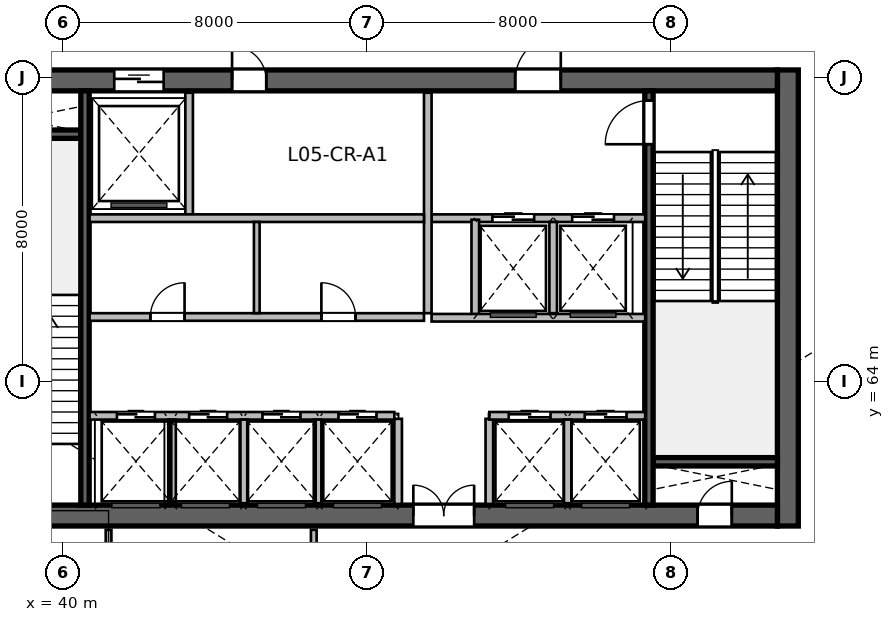
"""IFC4 building model, lengths in metres.
Left out: names, types, materials, properties, quantities, classifications, styles, units other than length and angle.
Written with IfcOpenShell. Run it as: python <this file> out.ifc"""

import sys

from ifc_helpers import new_model, si_unit, direction, frame, frame_2d, origin, place, context, subcontext, project, spatial, rectangle, extrude, source, transform, mapped, element, fill, save


model = new_model("IFC4")
c1 = context("Model", 3, precision=1e-05, world=origin(), true_north=direction((0.0, 1.0)))
c2 = subcontext(c1, "Body", "Model", "MODEL_VIEW")
j1 = project(units=[si_unit("LENGTHUNIT", "METRE"), si_unit("PLANEANGLEUNIT", "RADIAN")], contexts=[c1])
p1 = place(None, origin())
s1 = spatial("IfcSite", under=j1, at=p1, CompositionType="ELEMENT")
p2 = place(p1, origin())
s2 = spatial("IfcBuilding", under=s1, at=p2, CompositionType="ELEMENT")
p3 = place(p2, frame((0.0, 0.0, 30.0)))
s3 = spatial("IfcBuildingStorey", under=s2, at=p3, CompositionType="ELEMENT", Elevation=30.0)
m1 = source(origin(), c2, "Body", "SweptSolid", [
    extrude(rectangle(XDim=12.0, YDim=0.55, at=frame_2d((6.0, 0.0))), origin(), (0.0, 0.0, 1.0), 5.4),
])
p4 = place(p3, frame((59.075, 60.2, 0.0), z_axis=(0.0, 0.0, 1.0), x_axis=(0.0, 1.0, 0.0)))
e1 = element("IfcWall", 1, at=p4, inside=s3, PredefinedType="SHEAR", context=c2, shape_type="MappedRepresentation", body=[
    mapped(m1, transform((0.0, 0.0, 0.0), scale=1.0)),
])
m2 = source(origin(), c2, "Body", "SweptSolid", [
    extrude(rectangle(XDim=21.6, YDim=0.55, at=frame_2d((10.8, 0.0))), origin(), (0.0, 0.0, 1.0), 5.4),
])
p5 = place(p3, frame((37.2, 60.475, 0.0), z_axis=(0.0, 0.0, 1.0), x_axis=(1.0, 0.0, 0.0)))
e2 = element("IfcWall", 2, at=p5, inside=s3, PredefinedType="SHEAR", context=c2, shape_type="MappedRepresentation", body=[
    mapped(m2, transform((0.0, 0.0, 0.0), scale=1.0)),
])
p6 = place(p5, frame((1.1, 0.0, 0.0)))
e3 = element("IfcOpeningElement", 3, at=p6, cuts=e2, PredefinedType="OPENING", context=c2, shape_type="SweptSolid", body=[
    extrude(rectangle(XDim=1.15, YDim=2.15, at=frame_2d((0.575, 1.075))), frame((0.0, 0.285, 0.0), z_axis=(0.0, -1.0, 0.0), x_axis=(1.0, 0.0, 0.0)), (0.0, 0.0, 1.0), 0.57),
])
p7 = place(p5, frame((19.5, 0.0, 0.0)))
e4 = element("IfcOpeningElement", 4, at=p7, cuts=e2, PredefinedType="OPENING", context=c2, shape_type="SweptSolid", body=[
    extrude(rectangle(XDim=0.9, YDim=2.1, at=frame_2d((0.45, 1.05))), frame((0.0, 0.285, 0.0), z_axis=(0.0, -1.0, 0.0), x_axis=(1.0, 0.0, 0.0)), (0.0, 0.0, 1.0), 0.57),
])
p8 = place(p5, frame((12.02, 0.0, 0.0)))
e5 = element("IfcOpeningElement", 5, at=p8, cuts=e2, PredefinedType="OPENING", context=c2, shape_type="SweptSolid", body=[
    extrude(rectangle(XDim=1.6, YDim=2.15, at=frame_2d((0.8, 1.075))), frame((0.0, 0.285, 0.0), z_axis=(0.0, -1.0, 0.0), x_axis=(1.0, 0.0, 0.0)), (0.0, 0.0, 1.0), 0.57),
])
p9 = place(p3, frame((37.2, 71.925, 0.0), z_axis=(0.0, 0.0, 1.0), x_axis=(1.0, 0.0, 0.0)))
e6 = element("IfcWall", 6, at=p9, inside=s3, PredefinedType="SHEAR", context=c2, shape_type="MappedRepresentation", body=[
    mapped(m2, transform((0.0, 0.0, 0.0), scale=1.0)),
])
p10 = place(p9, frame((1.2, 0.0, 0.0)))
e7 = element("IfcOpeningElement", 7, at=p10, cuts=e6, PredefinedType="OPENING", context=c2, shape_type="SweptSolid", body=[
    extrude(rectangle(XDim=0.9, YDim=2.1, at=frame_2d((0.45, 1.05))), frame((0.0, 0.285, 0.0), z_axis=(0.0, -1.0, 0.0), x_axis=(1.0, 0.0, 0.0)), (0.0, 0.0, 1.0), 0.57),
])
p11 = place(p9, frame((14.7, 0.0, 0.0)))
e8 = element("IfcOpeningElement", 8, at=p11, cuts=e6, PredefinedType="OPENING", context=c2, shape_type="SweptSolid", body=[
    extrude(rectangle(XDim=1.2, YDim=2.15, at=frame_2d((0.6, 1.075))), frame((0.0, 0.285, 0.0), z_axis=(0.0, -1.0, 0.0), x_axis=(1.0, 0.0, 0.0)), (0.0, 0.0, 1.0), 0.57),
])
p12 = place(p9, frame((4.15, 0.0, 0.0)))
e9 = element("IfcOpeningElement", 9, at=p12, cuts=e6, PredefinedType="OPENING", context=c2, shape_type="SweptSolid", body=[
    extrude(rectangle(XDim=1.3, YDim=2.15, at=frame_2d((0.65, 1.075))), frame((0.0, 0.285, 0.0), z_axis=(0.0, -1.0, 0.0), x_axis=(1.0, 0.0, 0.0)), (0.0, 0.0, 1.0), 0.57),
])
p13 = place(p9, frame((7.25, 0.0, 0.0)))
e10 = element("IfcOpeningElement", 10, at=p13, cuts=e6, PredefinedType="OPENING", context=c2, shape_type="SweptSolid", body=[
    extrude(rectangle(XDim=0.9, YDim=2.1, at=frame_2d((0.45, 1.05))), frame((0.0, 0.285, 0.0), z_axis=(0.0, -1.0, 0.0), x_axis=(1.0, 0.0, 0.0)), (0.0, 0.0, 1.0), 0.57),
])
m3 = source(origin(), c2, "Body", "SweptSolid", [
    extrude(rectangle(XDim=3.27, YDim=0.22, at=frame_2d((1.635, 0.0))), origin(), (0.0, 0.0, 1.0), 5.4),
])
for number, where, z_axis, x_axis in (
    (11, (37.2, 70.51, 0.0), (0.0, 0.0, 1.0), (1.0, 0.0, 0.0)),
    (12, (55.53, 61.89, 0.0), (0.0, 0.0, 1.0), (1.0, 0.0, 0.0)),
):
    element("IfcWall", number, at=place(p3, frame(where, z_axis=z_axis, x_axis=x_axis)), inside=s3, PredefinedType="SHEAR", context=c2, shape_type="MappedRepresentation", body=[
        mapped(m3, transform((0.0, 0.0, 0.0), scale=1.0)),
    ])
m4 = source(origin(), c2, "Body", "SweptSolid", [
    extrude(rectangle(XDim=10.9, YDim=0.22, at=frame_2d((5.45, 0.0))), origin(), (0.0, 0.0, 1.0), 5.4),
])
p14 = place(p3, frame((40.58, 60.75, 0.0), z_axis=(0.0, 0.0, 1.0), x_axis=(0.0, 1.0, 0.0)))
e13 = element("IfcWall", 13, at=p14, inside=s3, PredefinedType="SHEAR", context=c2, shape_type="MappedRepresentation", body=[
    mapped(m4, transform((0.0, 0.0, 0.0), scale=1.0)),
])
p15 = place(p3, frame((55.42, 60.75, 0.0), z_axis=(0.0, 0.0, 1.0), x_axis=(0.0, 1.0, 0.0)))
e14 = element("IfcWall", 14, at=p15, inside=s3, PredefinedType="SHEAR", context=c2, shape_type="MappedRepresentation", body=[
    mapped(m4, transform((0.0, 0.0, 0.0), scale=1.0)),
])
p16 = place(p15, frame((9.495, 0.0, 0.0)))
e15 = element("IfcOpeningElement", 15, at=p16, cuts=e14, PredefinedType="OPENING", context=c2, shape_type="SweptSolid", body=[
    extrude(rectangle(XDim=1.15, YDim=2.15, at=frame_2d((0.575, 1.075))), frame((0.0, 0.12, 0.0), z_axis=(0.0, -1.0, 0.0), x_axis=(1.0, 0.0, 0.0)), (0.0, 0.0, 1.0), 0.24),
])
m5 = source(origin(), c2, "Body", "SweptSolid", [
    extrude(rectangle(XDim=2.24, YDim=0.2, at=frame_2d((1.12, 0.0))), origin(), (0.0, 0.0, 1.0), 5.16),
])
for number, where, z_axis, x_axis in (
    (16, (48.82, 60.78, 0.0), (0.0, 0.0, 1.0), (0.0, 1.0, 0.0)),
    (17, (51.22, 60.78, 0.0), (0.0, 0.0, 1.0), (0.0, 1.0, 0.0)),
):
    element("IfcWall", number, at=place(p3, frame(where, z_axis=z_axis, x_axis=x_axis)), inside=s3, PredefinedType="SOLIDWALL", context=c2, shape_type="MappedRepresentation", body=[
        mapped(m5, transform((0.0, 0.0, 0.0), scale=1.0)),
    ])
m6 = source(origin(), c2, "Body", "SweptSolid", [
    extrude(rectangle(XDim=5.62, YDim=0.2, at=frame_2d((2.81, 0.0))), origin(), (0.0, 0.0, 1.0), 5.16),
])
p17 = place(p3, frame((49.7, 68.3, 0.0), z_axis=(0.0, 0.0, 1.0), x_axis=(1.0, 0.0, 0.0)))
e18 = element("IfcWall", 18, at=p17, inside=s3, PredefinedType="SOLIDWALL", context=c2, shape_type="MappedRepresentation", body=[
    mapped(m6, transform((0.0, 0.0, 0.0), scale=1.0)),
])
p18 = place(p17, frame((1.6, 0.0, 0.0)))
e19 = element("IfcOpeningElement", 19, at=p18, cuts=e18, PredefinedType="OPENING", context=c2, shape_type="SweptSolid", body=[
    extrude(rectangle(XDim=1.1, YDim=2.15, at=frame_2d((0.55, 1.075))), frame((0.0, 0.11, 0.0), z_axis=(0.0, -1.0, 0.0), x_axis=(1.0, 0.0, 0.0)), (0.0, 0.0, 1.0), 0.22),
])
p19 = place(p17, frame((3.7, 0.0, 0.0)))
e20 = element("IfcOpeningElement", 20, at=p19, cuts=e18, PredefinedType="OPENING", context=c2, shape_type="SweptSolid", body=[
    extrude(rectangle(XDim=1.1, YDim=2.15, at=frame_2d((0.55, 1.075))), frame((0.0, 0.11, 0.0), z_axis=(0.0, -1.0, 0.0), x_axis=(1.0, 0.0, 0.0)), (0.0, 0.0, 1.0), 0.22),
])
m7 = source(origin(), c2, "Body", "SweptSolid", [
    extrude(rectangle(XDim=5.8, YDim=0.2, at=frame_2d((2.9, 0.0))), origin(), (0.0, 0.0, 1.0), 5.16),
])
p20 = place(p3, frame((49.6, 65.8, 0.0), z_axis=(0.0, 0.0, 1.0), x_axis=(0.0, 1.0, 0.0)))
e21 = element("IfcWall", 21, at=p20, inside=s3, PredefinedType="SOLIDWALL", context=c2, shape_type="MappedRepresentation", body=[
    mapped(m7, transform((0.0, 0.0, 0.0), scale=1.0)),
])
m8 = source(origin(), c2, "Body", "SweptSolid", [
    extrude(rectangle(XDim=2.58, YDim=0.2, at=frame_2d((1.29, 0.0))), origin(), (0.0, 0.0, 1.0), 5.16),
])
p21 = place(p3, frame((50.85, 65.68, 0.0), z_axis=(0.0, 0.0, 1.0), x_axis=(0.0, 1.0, 0.0)))
e22 = element("IfcWall", 22, at=p21, inside=s3, PredefinedType="SOLIDWALL", context=c2, shape_type="MappedRepresentation", body=[
    mapped(m8, transform((0.0, 0.0, 0.0), scale=1.0)),
])
m9 = source(origin(), c2, "Body", "SweptSolid", [
    extrude(rectangle(XDim=2.4, YDim=0.2, at=frame_2d((1.2, 0.0))), origin(), (0.0, 0.0, 1.0), 5.16),
])
p22 = place(p3, frame((52.9, 65.8, 0.0), z_axis=(0.0, 0.0, 1.0), x_axis=(0.0, 1.0, 0.0)))
e23 = element("IfcWall", 23, at=p22, inside=s3, PredefinedType="SOLIDWALL", context=c2, shape_type="MappedRepresentation", body=[
    mapped(m9, transform((0.0, 0.0, 0.0), scale=1.0)),
])
p23 = place(p3, frame((49.7, 65.68, 0.0), z_axis=(0.0, 0.0, 1.0), x_axis=(1.0, 0.0, 0.0)))
e24 = element("IfcWall", 24, at=p23, inside=s3, PredefinedType="SOLIDWALL", context=c2, shape_type="MappedRepresentation", body=[
    mapped(m6, transform((0.0, 0.0, 0.0), scale=1.0)),
])
m10 = source(origin(), c2, "Body", "SweptSolid", [
    extrude(rectangle(XDim=3.2, YDim=0.2, at=frame_2d((1.6, 0.0))), origin(), (0.0, 0.0, 1.0), 5.16),
])
p24 = place(p3, frame((43.32, 68.4, 0.0), z_axis=(0.0, 0.0, 1.0), x_axis=(0.0, 1.0, 0.0)))
e25 = element("IfcWall", 25, at=p24, inside=s3, PredefinedType="SOLIDWALL", context=c2, shape_type="MappedRepresentation", body=[
    mapped(m10, transform((0.0, 0.0, 0.0), scale=1.0)),
])
m11 = source(origin(), c2, "Body", "SweptSolid", [
    extrude(rectangle(XDim=8.8, YDim=0.2, at=frame_2d((4.4, 0.0))), origin(), (0.0, 0.0, 1.0), 5.16),
])
p25 = place(p3, frame((40.7, 68.3, 0.0), z_axis=(0.0, 0.0, 1.0), x_axis=(1.0, 0.0, 0.0)))
e26 = element("IfcWall", 26, at=p25, inside=s3, PredefinedType="SOLIDWALL", context=c2, shape_type="MappedRepresentation", body=[
    mapped(m11, transform((0.0, 0.0, 0.0), scale=1.0)),
])
m12 = source(origin(), c2, "Body", "SweptSolid", [
    extrude(rectangle(XDim=8.02, YDim=0.2, at=frame_2d((4.01, 0.0))), origin(), (0.0, 0.0, 1.0), 5.16),
])
p26 = place(p3, frame((40.7, 63.1, 0.0), z_axis=(0.0, 0.0, 1.0), x_axis=(1.0, 0.0, 0.0)))
e27 = element("IfcWall", 27, at=p26, inside=s3, PredefinedType="SOLIDWALL", context=c2, shape_type="MappedRepresentation", body=[
    mapped(m12, transform((0.0, 0.0, 0.0), scale=1.0)),
])
p27 = place(p26, frame((0.72, 0.0, 0.0)))
e28 = element("IfcOpeningElement", 28, at=p27, cuts=e27, PredefinedType="OPENING", context=c2, shape_type="SweptSolid", body=[
    extrude(rectangle(XDim=1.0, YDim=2.15, at=frame_2d((0.5, 1.075))), frame((0.0, 0.11, 0.0), z_axis=(0.0, -1.0, 0.0), x_axis=(1.0, 0.0, 0.0)), (0.0, 0.0, 1.0), 0.22),
])
p28 = place(p26, frame((2.62, 0.0, 0.0)))
e29 = element("IfcOpeningElement", 29, at=p28, cuts=e27, PredefinedType="OPENING", context=c2, shape_type="SweptSolid", body=[
    extrude(rectangle(XDim=1.0, YDim=2.15, at=frame_2d((0.5, 1.075))), frame((0.0, 0.11, 0.0), z_axis=(0.0, -1.0, 0.0), x_axis=(1.0, 0.0, 0.0)), (0.0, 0.0, 1.0), 0.22),
])
p29 = place(p26, frame((4.55, 0.0, 0.0)))
e30 = element("IfcOpeningElement", 30, at=p29, cuts=e27, PredefinedType="OPENING", context=c2, shape_type="SweptSolid", body=[
    extrude(rectangle(XDim=1.0, YDim=2.15, at=frame_2d((0.5, 1.075))), frame((0.0, 0.11, 0.0), z_axis=(0.0, -1.0, 0.0), x_axis=(1.0, 0.0, 0.0)), (0.0, 0.0, 1.0), 0.22),
])
p30 = place(p26, frame((6.55, 0.0, 0.0)))
e31 = element("IfcOpeningElement", 31, at=p30, cuts=e27, PredefinedType="OPENING", context=c2, shape_type="SweptSolid", body=[
    extrude(rectangle(XDim=1.0, YDim=2.15, at=frame_2d((0.5, 1.075))), frame((0.0, 0.11, 0.0), z_axis=(0.0, -1.0, 0.0), x_axis=(1.0, 0.0, 0.0)), (0.0, 0.0, 1.0), 0.22),
])
m13 = source(origin(), c2, "Body", "SweptSolid", [
    extrude(rectangle(XDim=4.1, YDim=0.2, at=frame_2d((2.05, 0.0))), origin(), (0.0, 0.0, 1.0), 5.16),
])
p31 = place(p3, frame((51.22, 63.1, 0.0), z_axis=(0.0, 0.0, 1.0), x_axis=(1.0, 0.0, 0.0)))
e32 = element("IfcWall", 32, at=p31, inside=s3, PredefinedType="SOLIDWALL", context=c2, shape_type="MappedRepresentation", body=[
    mapped(m13, transform((0.0, 0.0, 0.0), scale=1.0)),
])
p32 = place(p31, frame((0.51, 0.0, 0.0)))
e33 = element("IfcOpeningElement", 33, at=p32, cuts=e32, PredefinedType="OPENING", context=c2, shape_type="SweptSolid", body=[
    extrude(rectangle(XDim=1.1, YDim=2.15, at=frame_2d((0.55, 1.075))), frame((0.0, 0.11, 0.0), z_axis=(0.0, -1.0, 0.0), x_axis=(1.0, 0.0, 0.0)), (0.0, 0.0, 1.0), 0.22),
])
p33 = place(p31, frame((2.51, 0.0, 0.0)))
e34 = element("IfcOpeningElement", 34, at=p33, cuts=e32, PredefinedType="OPENING", context=c2, shape_type="SweptSolid", body=[
    extrude(rectangle(XDim=1.1, YDim=2.15, at=frame_2d((0.55, 1.075))), frame((0.0, 0.11, 0.0), z_axis=(0.0, -1.0, 0.0), x_axis=(1.0, 0.0, 0.0)), (0.0, 0.0, 1.0), 0.22),
])
m14 = source(origin(), c2, "Body", "SweptSolid", [
    extrude(rectangle(XDim=2.2, YDim=0.2, at=frame_2d((1.1, 0.0))), origin(), (0.0, 0.0, 1.0), 5.16),
])
for number, where, z_axis, x_axis in (
    (35, (42.87, 60.8, 0.0), (0.0, 0.0, 1.0), (0.0, 1.0, 0.0)),
    (36, (44.77, 60.8, 0.0), (0.0, 0.0, 1.0), (0.0, 1.0, 0.0)),
    (37, (46.7, 60.8, 0.0), (0.0, 0.0, 1.0), (0.0, 1.0, 0.0)),
    (38, (53.28, 60.8, 0.0), (0.0, 0.0, 1.0), (0.0, 1.0, 0.0)),
):
    element("IfcWall", number, at=place(p3, frame(where, z_axis=z_axis, x_axis=x_axis)), inside=s3, PredefinedType="SOLIDWALL", context=c2, shape_type="MappedRepresentation", body=[
        mapped(m14, transform((0.0, 0.0, 0.0), scale=1.0)),
    ])
p34 = place(p3, frame((40.7, 65.7, 0.0), z_axis=(0.0, 0.0, 1.0), x_axis=(1.0, 0.0, 0.0)))
e39 = element("IfcWall", 39, at=p34, inside=s3, PredefinedType="SOLIDWALL", context=c2, shape_type="MappedRepresentation", body=[
    mapped(m11, transform((0.0, 0.0, 0.0), scale=1.0)),
])
p35 = place(p34, frame((1.6, 0.0, 0.0)))
e40 = element("IfcOpeningElement", 40, at=p35, cuts=e39, PredefinedType="OPENING", context=c2, shape_type="SweptSolid", body=[
    extrude(rectangle(XDim=0.9, YDim=2.1, at=frame_2d((0.45, 1.05))), frame((0.0, 0.11, 0.0), z_axis=(0.0, -1.0, 0.0), x_axis=(1.0, 0.0, 0.0)), (0.0, 0.0, 1.0), 0.22),
])
p36 = place(p34, frame((6.1, 0.0, 0.0)))
e41 = element("IfcOpeningElement", 41, at=p36, cuts=e39, PredefinedType="OPENING", context=c2, shape_type="SweptSolid", body=[
    extrude(rectangle(XDim=0.9, YDim=2.1, at=frame_2d((0.45, 1.05))), frame((0.0, 0.11, 0.0), z_axis=(0.0, -1.0, 0.0), x_axis=(1.0, 0.0, 0.0)), (0.0, 0.0, 1.0), 0.22),
])
m15 = source(origin(), c2, "Body", "SweptSolid", [
    extrude(rectangle(XDim=2.4, YDim=0.15, at=frame_2d((1.2, 0.0))), origin(), (0.0, 0.0, 1.0), 5.16),
])
p37 = place(p3, frame((45.1, 65.8, 0.0), z_axis=(0.0, 0.0, 1.0), x_axis=(0.0, 1.0, 0.0)))
e42 = element("IfcWall", 42, at=p37, inside=s3, PredefinedType="PARTITIONING", context=c2, shape_type="MappedRepresentation", body=[
    mapped(m15, transform((0.0, 0.0, 0.0), scale=1.0)),
])
m16 = source(origin(), c2, "Body", "SweptSolid", [
    extrude(rectangle(XDim=2.033, YDim=0.15, at=frame_2d((1.016, 0.0))), origin(), (0.0, 0.0, 1.0), 5.16),
])
p38 = place(p3, frame((41.2, 58.067, 0.0), z_axis=(0.0, 0.0, 1.0), x_axis=(0.0, 1.0, 0.0)))
e43 = element("IfcWall", 43, at=p38, inside=s3, PredefinedType="PARTITIONING", context=c2, shape_type="MappedRepresentation", body=[
    mapped(m16, transform((0.0, 0.0, 0.0), scale=1.0)),
])
p39 = place(p38, frame((0.591, 0.0, 0.0)))
e44 = element("IfcOpeningElement", 44, at=p39, cuts=e43, PredefinedType="OPENING", context=c2, shape_type="SweptSolid", body=[
    extrude(rectangle(XDim=0.85, YDim=2.1, at=frame_2d((0.425, 1.05))), frame((0.0, 0.085, 0.0), z_axis=(0.0, -1.0, 0.0), x_axis=(1.0, 0.0, 0.0)), (0.0, 0.0, 1.0), 0.17),
])
p40 = place(p3, frame((46.6, 58.067, 0.0), z_axis=(0.0, 0.0, 1.0), x_axis=(0.0, 1.0, 0.0)))
e45 = element("IfcWall", 45, at=p40, inside=s3, PredefinedType="PARTITIONING", context=c2, shape_type="MappedRepresentation", body=[
    mapped(m16, transform((0.0, 0.0, 0.0), scale=1.0)),
])
m17 = source(origin(), c2, "Body", "SweptSolid", [
    extrude(rectangle(XDim=0.9, YDim=2.1, at=frame_2d((0.45, 1.05))), frame((0.0, 0.025, 0.0), z_axis=(0.0, -1.0, 0.0), x_axis=(1.0, 0.0, 0.0)), (0.0, 0.0, 1.0), 0.05),
])
p41 = place(p7, origin())
e46 = element("IfcDoor", 46, at=p41, inside=s3, OperationType="SINGLE_SWING_RIGHT", PredefinedType="DOOR", context=c2, shape_type="MappedRepresentation", body=[
    mapped(m17, transform((0.0, 0.0, 0.0), scale=1.0)),
])
fill(e4, e46)
m18 = source(origin(), c2, "Body", "SweptSolid", [
    extrude(rectangle(XDim=1.15, YDim=2.15, at=frame_2d((0.575, 1.075))), frame((0.0, 0.025, 0.0), z_axis=(0.0, -1.0, 0.0), x_axis=(1.0, 0.0, 0.0)), (0.0, 0.0, 1.0), 0.05),
])
p42 = place(p16, origin())
e47 = element("IfcDoor", 47, at=p42, inside=s3, OperationType="SINGLE_SWING_LEFT", PredefinedType="DOOR", context=c2, shape_type="MappedRepresentation", body=[
    mapped(m18, transform((0.0, 0.0, 0.0), scale=1.0)),
])
fill(e15, e47)
m19 = source(origin(), c2, "Body", "SweptSolid", [
    extrude(rectangle(XDim=1.6, YDim=2.15, at=frame_2d((0.8, 1.075))), frame((0.0, 0.025, 0.0), z_axis=(0.0, -1.0, 0.0), x_axis=(1.0, 0.0, 0.0)), (0.0, 0.0, 1.0), 0.05),
])
p43 = place(p8, origin())
e48 = element("IfcDoor", 48, at=p43, inside=s3, OperationType="DOUBLE_DOOR_SINGLE_SWING", PredefinedType="DOOR", context=c2, shape_type="MappedRepresentation", body=[
    mapped(m19, transform((0.0, 0.0, 0.0), scale=1.0)),
])
fill(e5, e48)
m20 = source(origin(), c2, "Body", "SweptSolid", [
    extrude(rectangle(XDim=1.2, YDim=2.15, at=frame_2d((0.6, 1.075))), frame((0.0, 0.025, 0.0), z_axis=(0.0, -1.0, 0.0), x_axis=(1.0, 0.0, 0.0)), (0.0, 0.0, 1.0), 0.05),
])
p44 = place(p11, origin())
e49 = element("IfcDoor", 49, at=p44, inside=s3, OperationType="SINGLE_SWING_RIGHT", PredefinedType="DOOR", context=c2, shape_type="MappedRepresentation", body=[
    mapped(m20, transform((0.0, 0.0, 0.0), scale=1.0)),
])
fill(e8, e49)
m21 = source(origin(), c2, "Body", "SweptSolid", [
    extrude(rectangle(XDim=1.1, YDim=2.15, at=frame_2d((0.55, 1.075))), frame((0.0, 0.025, 0.0), z_axis=(0.0, -1.0, 0.0), x_axis=(1.0, 0.0, 0.0)), (0.0, 0.0, 1.0), 0.05),
])
p45 = place(p18, origin())
e50 = element("IfcDoor", 50, at=p45, inside=s3, OperationType="DOUBLE_DOOR_SLIDING", PredefinedType="DOOR", context=c2, shape_type="MappedRepresentation", body=[
    mapped(m21, transform((0.0, 0.0, 0.0), scale=1.0)),
])
fill(e19, e50)
p46 = place(p19, origin())
e51 = element("IfcDoor", 51, at=p46, inside=s3, OperationType="DOUBLE_DOOR_SLIDING", PredefinedType="DOOR", context=c2, shape_type="MappedRepresentation", body=[
    mapped(m21, transform((0.0, 0.0, 0.0), scale=1.0)),
])
fill(e20, e51)
m22 = source(origin(), c2, "Body", "SweptSolid", [
    extrude(rectangle(XDim=1.3, YDim=2.15, at=frame_2d((0.65, 1.075))), frame((0.0, 0.025, 0.0), z_axis=(0.0, -1.0, 0.0), x_axis=(1.0, 0.0, 0.0)), (0.0, 0.0, 1.0), 0.05),
])
p47 = place(p12, origin())
e52 = element("IfcDoor", 52, at=p47, inside=s3, OperationType="DOUBLE_DOOR_SLIDING", PredefinedType="DOOR", context=c2, shape_type="MappedRepresentation", body=[
    mapped(m22, transform((0.0, 0.0, 0.0), scale=1.0)),
])
fill(e9, e52)
p48 = place(p13, origin())
e53 = element("IfcDoor", 53, at=p48, inside=s3, OperationType="SINGLE_SWING_LEFT", PredefinedType="DOOR", context=c2, shape_type="MappedRepresentation", body=[
    mapped(m17, transform((0.0, 0.0, 0.0), scale=1.0)),
])
fill(e10, e53)
m23 = source(origin(), c2, "Body", "SweptSolid", [
    extrude(rectangle(XDim=1.0, YDim=2.15, at=frame_2d((0.5, 1.075))), frame((0.0, 0.025, 0.0), z_axis=(0.0, -1.0, 0.0), x_axis=(1.0, 0.0, 0.0)), (0.0, 0.0, 1.0), 0.05),
])
p49 = place(p27, origin())
e54 = element("IfcDoor", 54, at=p49, inside=s3, OperationType="DOUBLE_DOOR_SLIDING", PredefinedType="DOOR", context=c2, shape_type="MappedRepresentation", body=[
    mapped(m23, transform((0.0, 0.0, 0.0), scale=1.0)),
])
fill(e28, e54)
p50 = place(p28, origin())
e55 = element("IfcDoor", 55, at=p50, inside=s3, OperationType="DOUBLE_DOOR_SLIDING", PredefinedType="DOOR", context=c2, shape_type="MappedRepresentation", body=[
    mapped(m23, transform((0.0, 0.0, 0.0), scale=1.0)),
])
fill(e29, e55)
p51 = place(p29, origin())
e56 = element("IfcDoor", 56, at=p51, inside=s3, OperationType="DOUBLE_DOOR_SLIDING", PredefinedType="DOOR", context=c2, shape_type="MappedRepresentation", body=[
    mapped(m23, transform((0.0, 0.0, 0.0), scale=1.0)),
])
fill(e30, e56)
p52 = place(p30, origin())
e57 = element("IfcDoor", 57, at=p52, inside=s3, OperationType="DOUBLE_DOOR_SLIDING", PredefinedType="DOOR", context=c2, shape_type="MappedRepresentation", body=[
    mapped(m23, transform((0.0, 0.0, 0.0), scale=1.0)),
])
fill(e31, e57)
m24 = source(origin(), c2, "Body", "SweptSolid", [
    extrude(rectangle(XDim=1.1, YDim=2.15, at=frame_2d((0.55, 1.075))), frame((0.0, 0.025, 0.0), z_axis=(0.0, -1.0, 0.0), x_axis=(1.0, 0.0, 0.0)), (0.0, 0.0, 1.0), 0.05),
])
p53 = place(p32, origin())
e58 = element("IfcDoor", 58, at=p53, inside=s3, OperationType="DOUBLE_DOOR_SLIDING", PredefinedType="DOOR", context=c2, shape_type="MappedRepresentation", body=[
    mapped(m24, transform((0.0, 0.0, 0.0), scale=1.0)),
])
fill(e33, e58)
p54 = place(p33, origin())
e59 = element("IfcDoor", 59, at=p54, inside=s3, OperationType="DOUBLE_DOOR_SLIDING", PredefinedType="DOOR", context=c2, shape_type="MappedRepresentation", body=[
    mapped(m24, transform((0.0, 0.0, 0.0), scale=1.0)),
])
fill(e34, e59)
p55 = place(p35, origin())
e60 = element("IfcDoor", 60, at=p55, inside=s3, OperationType="SINGLE_SWING_RIGHT", PredefinedType="DOOR", context=c2, shape_type="MappedRepresentation", body=[
    mapped(m17, transform((0.0, 0.0, 0.0), scale=1.0)),
])
fill(e40, e60)
p56 = place(p36, origin())
e61 = element("IfcDoor", 61, at=p56, inside=s3, OperationType="SINGLE_SWING_LEFT", PredefinedType="DOOR", context=c2, shape_type="MappedRepresentation", body=[
    mapped(m17, transform((0.0, 0.0, 0.0), scale=1.0)),
])
fill(e41, e61)
save(model, sys.argv[1])
